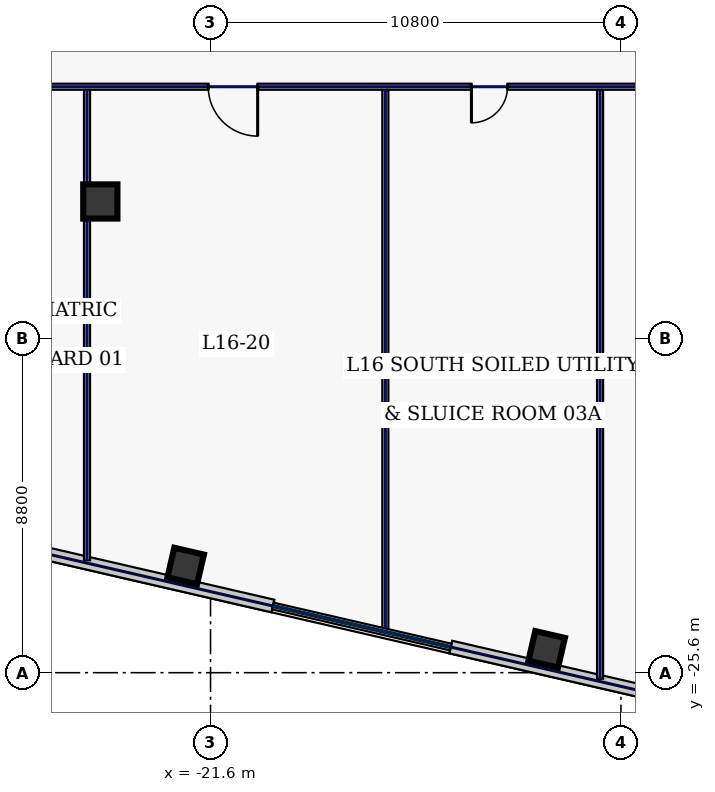
"""IFC4 building model, lengths in metres.
Left out: names, types, materials, properties, quantities, classifications, styles, units other than length and angle.
Written with IfcOpenShell. Run it as: python <this file> out.ifc"""

import sys

from ifc_helpers import new_model, si_unit, direction, frame, frame_2d, origin, origin_2d, place, context, subcontext, project, spatial, rectangle, hollow_rectangle, extrude, element, fill, save


model = new_model("IFC4")
c1 = context("Model", 3, precision=1e-05, world=origin(), true_north=direction((0.0, 1.0)))
c2 = subcontext(c1, "Body", "Model", "MODEL_VIEW")
j1 = project(units=[si_unit("LENGTHUNIT", "METRE"), si_unit("PLANEANGLEUNIT", "RADIAN")], contexts=[c1])
p1 = place(None, origin())
s1 = spatial("IfcSite", under=j1, at=p1, CompositionType="ELEMENT")
p2 = place(p1, origin())
s2 = spatial("IfcBuilding", under=s1, at=p2, CompositionType="ELEMENT")
p3 = place(p2, frame((0.0, 0.0, 75.4)))
s3 = spatial("IfcBuildingStorey", under=s2, at=p3, CompositionType="ELEMENT", Elevation=75.4)
p4 = place(p3, frame((-24.5, -13.2, 0.0), z_axis=(0.0, 0.0, 1.0), x_axis=(1.0, 0.0, 0.0)))
e1 = element("IfcColumn", 1, at=p4, inside=s3, PredefinedType="COLUMN", context=c2, shape_type="SweptSolid", body=[
    extrude(hollow_rectangle(XDim=0.9, YDim=0.9, WallThickness=0.04, at=origin_2d()), origin(), (0.0, 0.0, 1.0), 3.74),
])
for number, where, z_axis, x_axis in (
    (2, (-22.254, -22.792, 0.0), (0.0, 0.0, 1.0), (0.974, -0.225, 0.0)),
    (3, (-12.755, -24.985, 0.0), (0.0, 0.0, 1.0), (0.974, -0.225, 0.0)),
):
    element("IfcColumn", number, at=place(p3, frame(where, z_axis=z_axis, x_axis=x_axis)), inside=s3, PredefinedType="COLUMN", context=c2, shape_type="SweptSolid", body=[
        extrude(hollow_rectangle(XDim=0.8, YDim=0.8, WallThickness=0.036, at=origin_2d()), origin(), (0.0, 0.0, 1.0), 3.74),
    ])
p5 = place(p3, frame((-42.029, -18.75, 0.0), z_axis=(0.0, 0.0, 1.0), x_axis=(0.97436993772, -0.224951604723, 0.0)))
e4 = element("IfcWall", 4, at=p5, inside=s3, PredefinedType="STANDARD", context=c2, shape_type="SweptSolid", body=[
    extrude(rectangle(XDim=22.651, YDim=0.34, at=frame_2d((11.326, 0.0))), origin(), (0.0, 0.0, 1.0), 3.74),
])
p6 = place(p5, frame((2.062, 0.0, 0.72)))
e5 = element("IfcOpeningElement", 5, at=p6, cuts=e4, PredefinedType="OPENING", context=c2, shape_type="SweptSolid", body=[
    extrude(rectangle(XDim=2.5, YDim=2.15, at=frame_2d((1.25, 1.075))), frame((0.0, 0.18, 0.0), z_axis=(0.0, -1.0, 0.0), x_axis=(1.0, 0.0, 0.0)), (0.0, 0.0, 1.0), 0.36),
])
p7 = place(p5, frame((6.546, 0.0, 0.72)))
e6 = element("IfcOpeningElement", 6, at=p7, cuts=e4, PredefinedType="OPENING", context=c2, shape_type="SweptSolid", body=[
    extrude(rectangle(XDim=2.5, YDim=2.15, at=frame_2d((1.25, 1.075))), frame((0.0, 0.18, 0.0), z_axis=(0.0, -1.0, 0.0), x_axis=(1.0, 0.0, 0.0)), (0.0, 0.0, 1.0), 0.36),
])
p8 = place(p5, frame((13.461, 0.0, 0.72)))
e7 = element("IfcOpeningElement", 7, at=p8, cuts=e4, PredefinedType="OPENING", context=c2, shape_type="SweptSolid", body=[
    extrude(rectangle(XDim=0.85, YDim=1.85, at=frame_2d((0.425, 0.925))), frame((0.0, 0.18, 0.0), z_axis=(0.0, -1.0, 0.0), x_axis=(1.0, 0.0, 0.0)), (0.0, 0.0, 1.0), 0.36),
])
p9 = place(p3, frame((-15.281, -24.925, 0.0), z_axis=(0.0, 0.0, 1.0), x_axis=(0.974370193991, -0.22495049469, 0.0)))
e8 = element("IfcWall", 8, at=p9, inside=s3, PredefinedType="STANDARD", context=c2, shape_type="SweptSolid", body=[
    extrude(rectangle(XDim=14.697, YDim=0.34, at=frame_2d((7.349, 0.0))), origin(), (0.0, 0.0, 1.0), 3.74),
])
p10 = place(p9, frame((5.506, 0.0, 0.72)))
e9 = element("IfcOpeningElement", 9, at=p10, cuts=e8, PredefinedType="OPENING", context=c2, shape_type="SweptSolid", body=[
    extrude(rectangle(XDim=0.85, YDim=1.85, at=frame_2d((0.425, 0.925))), frame((0.0, 0.18, 0.0), z_axis=(0.0, -1.0, 0.0), x_axis=(1.0, 0.0, 0.0)), (0.0, 0.0, 1.0), 0.36),
])
p11 = place(p9, frame((9.991, 0.0, 0.72)))
e10 = element("IfcOpeningElement", 10, at=p11, cuts=e8, PredefinedType="OPENING", context=c2, shape_type="SweptSolid", body=[
    extrude(rectangle(XDim=0.85, YDim=1.85, at=frame_2d((0.425, 0.925))), frame((0.0, 0.18, 0.0), z_axis=(0.0, -1.0, 0.0), x_axis=(1.0, 0.0, 0.0)), (0.0, 0.0, 1.0), 0.36),
])
p12 = place(p3, frame((29.415, -10.18, 0.0), z_axis=(0.0, 0.0, 1.0), x_axis=(-1.0, 0.0, 0.0)))
e11 = element("IfcWall", 11, at=p12, inside=s3, PredefinedType="PARTITIONING", context=c2, shape_type="SweptSolid", body=[
    extrude(rectangle(XDim=58.83, YDim=0.16, at=frame_2d((29.415, 0.0))), origin(), (0.0, 0.0, 1.0), 3.74),
])
p13 = place(p12, frame((55.831, 0.0, 0.0)))
e12 = element("IfcOpeningElement", 12, at=p13, cuts=e11, PredefinedType="OPENING", context=c2, shape_type="SweptSolid", body=[
    extrude(rectangle(XDim=1.3, YDim=2.2, at=frame_2d((0.65, 1.1))), frame((0.0, 0.09, 0.0), z_axis=(0.0, -1.0, 0.0), x_axis=(1.0, 0.0, 0.0)), (0.0, 0.0, 1.0), 0.18),
])
p14 = place(p12, frame((49.775, 0.0, 0.0)))
e13 = element("IfcOpeningElement", 13, at=p14, cuts=e11, PredefinedType="OPENING", context=c2, shape_type="SweptSolid", body=[
    extrude(rectangle(XDim=1.3, YDim=2.2, at=frame_2d((0.65, 1.1))), frame((0.0, 0.09, 0.0), z_axis=(0.0, -1.0, 0.0), x_axis=(1.0, 0.0, 0.0)), (0.0, 0.0, 1.0), 0.18),
])
p15 = place(p12, frame((43.2, 0.0, 0.0)))
e14 = element("IfcOpeningElement", 14, at=p15, cuts=e11, PredefinedType="OPENING", context=c2, shape_type="SweptSolid", body=[
    extrude(rectangle(XDim=0.95, YDim=2.2, at=frame_2d((0.475, 1.1))), frame((0.0, 0.09, 0.0), z_axis=(0.0, -1.0, 0.0), x_axis=(1.0, 0.0, 0.0)), (0.0, 0.0, 1.0), 0.18),
])
p16 = place(p12, frame((38.0, 0.0, 0.0)))
e15 = element("IfcOpeningElement", 15, at=p16, cuts=e11, PredefinedType="OPENING", context=c2, shape_type="SweptSolid", body=[
    extrude(rectangle(XDim=0.95, YDim=2.2, at=frame_2d((0.475, 1.1))), frame((0.0, 0.09, 0.0), z_axis=(0.0, -1.0, 0.0), x_axis=(1.0, 0.0, 0.0)), (0.0, 0.0, 1.0), 0.18),
])
p17 = place(p12, frame((32.7, 0.0, 0.0)))
e16 = element("IfcOpeningElement", 16, at=p17, cuts=e11, PredefinedType="OPENING", context=c2, shape_type="SweptSolid", body=[
    extrude(rectangle(XDim=0.95, YDim=2.2, at=frame_2d((0.475, 1.1))), frame((0.0, 0.09, 0.0), z_axis=(0.0, -1.0, 0.0), x_axis=(1.0, 0.0, 0.0)), (0.0, 0.0, 1.0), 0.18),
])
p18 = place(p12, frame((27.3, 0.0, 0.0)))
e17 = element("IfcOpeningElement", 17, at=p18, cuts=e11, PredefinedType="OPENING", context=c2, shape_type="SweptSolid", body=[
    extrude(rectangle(XDim=0.95, YDim=2.2, at=frame_2d((0.475, 1.1))), frame((0.0, 0.09, 0.0), z_axis=(0.0, -1.0, 0.0), x_axis=(1.0, 0.0, 0.0)), (0.0, 0.0, 1.0), 0.18),
])
p19 = place(p12, frame((21.87, 0.0, 0.0)))
e18 = element("IfcOpeningElement", 18, at=p19, cuts=e11, PredefinedType="OPENING", context=c2, shape_type="SweptSolid", body=[
    extrude(rectangle(XDim=1.05, YDim=2.2, at=frame_2d((0.525, 1.1))), frame((0.0, 0.09, 0.0), z_axis=(0.0, -1.0, 0.0), x_axis=(1.0, 0.0, 0.0)), (0.0, 0.0, 1.0), 0.18),
])
p20 = place(p12, frame((16.41, 0.0, 0.0)))
e19 = element("IfcOpeningElement", 19, at=p20, cuts=e11, PredefinedType="OPENING", context=c2, shape_type="SweptSolid", body=[
    extrude(rectangle(XDim=0.95, YDim=2.2, at=frame_2d((0.475, 1.1))), frame((0.0, 0.09, 0.0), z_axis=(0.0, -1.0, 0.0), x_axis=(1.0, 0.0, 0.0)), (0.0, 0.0, 1.0), 0.18),
])
p21 = place(p12, frame((11.66, 0.0, 0.0)))
e20 = element("IfcOpeningElement", 20, at=p21, cuts=e11, PredefinedType="OPENING", context=c2, shape_type="SweptSolid", body=[
    extrude(rectangle(XDim=1.45, YDim=2.2, at=frame_2d((0.725, 1.1))), frame((0.0, 0.09, 0.0), z_axis=(0.0, -1.0, 0.0), x_axis=(1.0, 0.0, 0.0)), (0.0, 0.0, 1.0), 0.18),
])
p22 = place(p12, frame((7.97, 0.0, 0.0)))
e21 = element("IfcOpeningElement", 21, at=p22, cuts=e11, PredefinedType="OPENING", context=c2, shape_type="SweptSolid", body=[
    extrude(rectangle(XDim=1.3, YDim=2.2, at=frame_2d((0.65, 1.1))), frame((0.0, 0.09, 0.0), z_axis=(0.0, -1.0, 0.0), x_axis=(1.0, 0.0, 0.0)), (0.0, 0.0, 1.0), 0.18),
])
p23 = place(p12, frame((4.375, 0.0, 0.0)))
e22 = element("IfcOpeningElement", 22, at=p23, cuts=e11, PredefinedType="OPENING", context=c2, shape_type="SweptSolid", body=[
    extrude(rectangle(XDim=1.3, YDim=2.2, at=frame_2d((0.65, 1.1))), frame((0.0, 0.09, 0.0), z_axis=(0.0, -1.0, 0.0), x_axis=(1.0, 0.0, 0.0)), (0.0, 0.0, 1.0), 0.18),
])
p24 = place(p12, frame((1.244, 0.0, 0.0)))
e23 = element("IfcOpeningElement", 23, at=p24, cuts=e11, PredefinedType="OPENING", context=c2, shape_type="SweptSolid", body=[
    extrude(rectangle(XDim=1.05, YDim=2.2, at=frame_2d((0.525, 1.1))), frame((0.0, 0.09, 0.0), z_axis=(0.0, -1.0, 0.0), x_axis=(1.0, 0.0, 0.0)), (0.0, 0.0, 1.0), 0.18),
])
p25 = place(p3, frame((-24.85, -22.644, 0.0), z_axis=(0.0, 0.0, 1.0), x_axis=(0.0, 1.0, 0.0)))
e24 = element("IfcWall", 24, at=p25, inside=s3, PredefinedType="PARTITIONING", context=c2, shape_type="SweptSolid", body=[
    extrude(rectangle(XDim=12.379, YDim=0.16, at=frame_2d((6.189, 0.0))), origin(), (0.0, 0.0, 1.0), 3.74),
])
p26 = place(p3, frame((-17.0, -24.456, 0.0), z_axis=(0.0, 0.0, 1.0), x_axis=(0.0, 1.0, 0.0)))
e25 = element("IfcWall", 25, at=p26, inside=s3, PredefinedType="PARTITIONING", context=c2, shape_type="SweptSolid", body=[
    extrude(rectangle(XDim=14.191, YDim=0.16, at=frame_2d((7.096, 0.0))), origin(), (0.0, 0.0, 1.0), 3.74),
])
p27 = place(p3, frame((-11.35, -25.761, 0.0), z_axis=(0.0, 0.0, 1.0), x_axis=(0.0, 1.0, 0.0)))
e26 = element("IfcWall", 26, at=p27, inside=s3, PredefinedType="PARTITIONING", context=c2, shape_type="SweptSolid", body=[
    extrude(rectangle(XDim=15.496, YDim=0.16, at=frame_2d((7.748, 0.0))), origin(), (0.0, 0.0, 1.0), 3.74),
])
p28 = place(p14, origin())
e27 = element("IfcDoor", 27, at=p28, inside=s3, OperationType="SINGLE_SWING_LEFT", PredefinedType="DOOR", context=c2, shape_type="SweptSolid", body=[
    extrude(rectangle(XDim=1.3, YDim=2.2, at=frame_2d((0.65, 1.1))), frame((0.0, 0.025, 0.0), z_axis=(0.0, -1.0, 0.0), x_axis=(1.0, 0.0, 0.0)), (0.0, 0.0, 1.0), 0.05),
])
fill(e13, e27)
p29 = place(p15, origin())
e28 = element("IfcDoor", 28, at=p29, inside=s3, OperationType="SINGLE_SWING_RIGHT", PredefinedType="DOOR", context=c2, shape_type="SweptSolid", body=[
    extrude(rectangle(XDim=0.95, YDim=2.2, at=frame_2d((0.475, 1.1))), frame((0.0, 0.025, 0.0), z_axis=(0.0, -1.0, 0.0), x_axis=(1.0, 0.0, 0.0)), (0.0, 0.0, 1.0), 0.05),
])
fill(e14, e28)
save(model, sys.argv[1])
